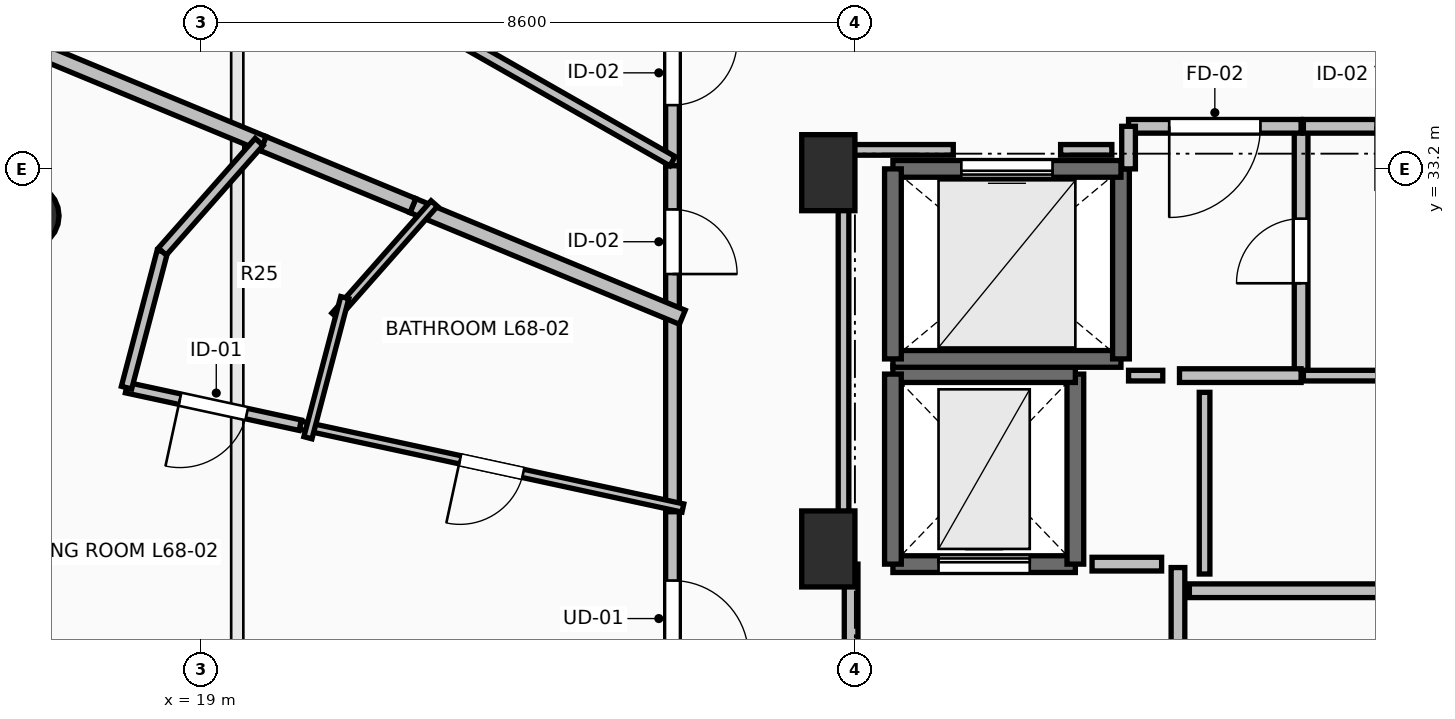
"""IFC4 building model, lengths in metres.
Left out: names, types, materials, properties, quantities, classifications, styles, units other than length and angle.
Written with IfcOpenShell. Run it as: python <this file> out.ifc"""

import sys

from ifc_helpers import new_model, si_unit, direction, frame, frame_2d, origin, origin_2d, place, context, subcontext, project, spatial, rectangle, circle, extrude, element, fill, save


model = new_model("IFC4")
c1 = context("Model", 3, precision=1e-05, world=origin(), true_north=direction((0.0, 1.0)))
c2 = subcontext(c1, "Body", "Model", "MODEL_VIEW")
j1 = project(units=[si_unit("LENGTHUNIT", "METRE"), si_unit("PLANEANGLEUNIT", "RADIAN")], contexts=[c1])
p1 = place(None, origin())
s1 = spatial("IfcSite", under=j1, at=p1, CompositionType="ELEMENT")
p2 = place(p1, origin())
s2 = spatial("IfcBuilding", under=s1, at=p2, CompositionType="ELEMENT")
p3 = place(p2, frame((0.0, 0.0, 252.0)))
s3 = spatial("IfcBuildingStorey", under=s2, at=p3, CompositionType="ELEMENT", Elevation=252.0)
p4 = place(p3, frame((16.705, 32.582, 0.0), z_axis=(0.0, 0.0, 1.0), x_axis=(-0.923879532511, 0.382683432365, 0.0)))
e1 = element("IfcColumn", 1, at=p4, inside=s3, PredefinedType="COLUMN", context=c2, shape_type="SweptSolid", body=[
    extrude(circle(Radius=0.425, at=origin_2d()), origin(), (0.0, 0.0, 1.0), 3.55),
])
for number, where, z_axis, x_axis in (
    (2, (27.25, 28.2, 0.0), (0.0, 0.0, 1.0), (1.0, 0.0, 0.0)),
    (3, (27.25, 33.15, 0.0), (0.0, 0.0, 1.0), (1.0, 0.0, 0.0)),
):
    element("IfcColumn", number, at=place(p3, frame(where, z_axis=z_axis, x_axis=x_axis)), inside=s3, PredefinedType="PILASTER", context=c2, shape_type="SweptSolid", body=[
        extrude(rectangle(XDim=0.7, YDim=1.0, at=origin_2d()), origin(), (0.0, 0.0, 1.0), 3.55),
    ])
p5 = place(p3, frame((28.1, 28.0, 0.0), z_axis=(0.0, 0.0, 1.0), x_axis=(1.0, 0.0, 0.0)))
e4 = element("IfcWall", 4, at=p5, inside=s3, PredefinedType="SHEAR", context=c2, shape_type="SweptSolid", body=[
    extrude(rectangle(XDim=2.4, YDim=0.22, at=frame_2d((1.2, 0.0))), origin(), (0.0, 0.0, 1.0), 3.29),
])
p6 = place(p5, frame((0.6, 0.0, 0.0)))
e5 = element("IfcOpeningElement", 5, at=p6, cuts=e4, PredefinedType="OPENING", context=c2, shape_type="SweptSolid", body=[
    extrude(rectangle(XDim=1.2, YDim=2.2, at=frame_2d((0.6, 1.1))), frame((0.0, 0.125, 0.0), z_axis=(0.0, -1.0, 0.0), x_axis=(1.0, 0.0, 0.0)), (0.0, 0.0, 1.0), 0.25),
])
p7 = place(p3, frame((30.5, 28.0, 0.0), z_axis=(0.0, 0.0, 1.0), x_axis=(0.0, 1.0, 0.0)))
e6 = element("IfcWall", 6, at=p7, inside=s3, PredefinedType="SHEAR", context=c2, shape_type="SweptSolid", body=[
    extrude(rectangle(XDim=2.5, YDim=0.22, at=frame_2d((1.25, 0.0))), origin(), (0.0, 0.0, 1.0), 3.29),
])
p8 = place(p3, frame((30.5, 30.5, 0.0), z_axis=(0.0, 0.0, 1.0), x_axis=(-1.0, 0.0, 0.0)))
e7 = element("IfcWall", 7, at=p8, inside=s3, PredefinedType="SHEAR", context=c2, shape_type="SweptSolid", body=[
    extrude(rectangle(XDim=2.4, YDim=0.22, at=frame_2d((1.2, 0.0))), origin(), (0.0, 0.0, 1.0), 3.29),
])
p9 = place(p3, frame((28.1, 30.5, 0.0), z_axis=(0.0, 0.0, 1.0), x_axis=(0.0, -1.0, 0.0)))
e8 = element("IfcWall", 8, at=p9, inside=s3, PredefinedType="SHEAR", context=c2, shape_type="SweptSolid", body=[
    extrude(rectangle(XDim=2.5, YDim=0.22, at=frame_2d((1.25, 0.0))), origin(), (0.0, 0.0, 1.0), 3.29),
])
p10 = place(p3, frame((28.1, 30.7, 0.0), z_axis=(0.0, 0.0, 1.0), x_axis=(1.0, 0.0, 0.0)))
e9 = element("IfcWall", 9, at=p10, inside=s3, PredefinedType="SOLIDWALL", context=c2, shape_type="SweptSolid", body=[
    extrude(rectangle(XDim=3.0, YDim=0.22, at=frame_2d((1.5, 0.0))), origin(), (0.0, 0.0, 1.0), 3.29),
])
p11 = place(p3, frame((31.1, 30.7, 0.0), z_axis=(0.0, 0.0, 1.0), x_axis=(0.0, 1.0, 0.0)))
e10 = element("IfcWall", 10, at=p11, inside=s3, PredefinedType="SOLIDWALL", context=c2, shape_type="SweptSolid", body=[
    extrude(rectangle(XDim=2.5, YDim=0.22, at=frame_2d((1.25, 0.0))), origin(), (0.0, 0.0, 1.0), 3.29),
])
p12 = place(p3, frame((31.1, 33.2, 0.0), z_axis=(0.0, 0.0, 1.0), x_axis=(-1.0, 0.0, 0.0)))
e11 = element("IfcWall", 11, at=p12, inside=s3, PredefinedType="SOLIDWALL", context=c2, shape_type="SweptSolid", body=[
    extrude(rectangle(XDim=3.0, YDim=0.22, at=frame_2d((1.5, 0.0))), origin(), (0.0, 0.0, 1.0), 3.29),
])
p13 = place(p12, frame((0.9, 0.0, 0.0)))
e12 = element("IfcOpeningElement", 12, at=p13, cuts=e11, PredefinedType="OPENING", context=c2, shape_type="SweptSolid", body=[
    extrude(rectangle(XDim=1.2, YDim=2.2, at=frame_2d((0.6, 1.1))), frame((0.0, 0.125, 0.0), z_axis=(0.0, -1.0, 0.0), x_axis=(1.0, 0.0, 0.0)), (0.0, 0.0, 1.0), 0.25),
])
p14 = place(p3, frame((28.1, 33.2, 0.0), z_axis=(0.0, 0.0, 1.0), x_axis=(0.0, -1.0, 0.0)))
e13 = element("IfcWall", 13, at=p14, inside=s3, PredefinedType="SOLIDWALL", context=c2, shape_type="SweptSolid", body=[
    extrude(rectangle(XDim=2.5, YDim=0.22, at=frame_2d((1.25, 0.0))), origin(), (0.0, 0.0, 1.0), 3.29),
])
p15 = place(p3, frame((31.85, 24.045, 0.0), z_axis=(0.0, 0.0, 1.0), x_axis=(0.0, 1.0, 0.0)))
e14 = element("IfcWall", 14, at=p15, inside=s3, PredefinedType="PARTITIONING", context=c2, shape_type="SweptSolid", body=[
    extrude(rectangle(XDim=3.91, YDim=0.18, at=frame_2d((1.955, 0.0))), origin(), (0.0, 0.0, 1.0), 3.29),
])
p16 = place(p15, frame((1.355, 0.0, 0.0)))
e15 = element("IfcOpeningElement", 15, at=p16, cuts=e14, PredefinedType="OPENING", context=c2, shape_type="SweptSolid", body=[
    extrude(rectangle(XDim=1.2, YDim=2.15, at=frame_2d((0.6, 1.075))), frame((0.0, 0.105, 0.0), z_axis=(0.0, -1.0, 0.0), x_axis=(1.0, 0.0, 0.0)), (0.0, 0.0, 1.0), 0.21),
])
p17 = place(p3, frame((27.55, 28.0, 0.0), z_axis=(0.0, 0.0, 1.0), x_axis=(0.0, -1.0, 0.0)))
e16 = element("IfcWall", 16, at=p17, inside=s3, PredefinedType="PARTITIONING", context=c2, shape_type="SweptSolid", body=[
    extrude(rectangle(XDim=4.05, YDim=0.18, at=frame_2d((2.025, 0.0))), origin(), (0.0, 0.0, 1.0), 3.29),
])
p18 = place(p17, frame((1.425, 0.0, 0.0)))
e17 = element("IfcOpeningElement", 17, at=p18, cuts=e16, PredefinedType="OPENING", context=c2, shape_type="SweptSolid", body=[
    extrude(rectangle(XDim=1.2, YDim=2.15, at=frame_2d((0.6, 1.075))), frame((0.0, 0.105, 0.0), z_axis=(0.0, -1.0, 0.0), x_axis=(1.0, 0.0, 0.0)), (0.0, 0.0, 1.0), 0.21),
])
p19 = place(p3, frame((33.47, 30.48, 0.0), z_axis=(0.0, 0.0, 1.0), x_axis=(0.0, 1.0, 0.0)))
e18 = element("IfcWall", 18, at=p19, inside=s3, PredefinedType="PARTITIONING", context=c2, shape_type="SweptSolid", body=[
    extrude(rectangle(XDim=3.28, YDim=0.18, at=frame_2d((1.64, 0.0))), origin(), (0.0, 0.0, 1.0), 3.29),
])
p20 = place(p19, frame((1.215, 0.0, 0.0)))
e19 = element("IfcOpeningElement", 19, at=p20, cuts=e18, PredefinedType="OPENING", context=c2, shape_type="SweptSolid", body=[
    extrude(rectangle(XDim=0.85, YDim=2.1, at=frame_2d((0.425, 1.05))), frame((0.0, 0.105, 0.0), z_axis=(0.0, -1.0, 0.0), x_axis=(1.0, 0.0, 0.0)), (0.0, 0.0, 1.0), 0.21),
])
p21 = place(p3, frame((31.87, 30.48, 0.0), z_axis=(0.0, 0.0, 1.0), x_axis=(1.0, 0.0, 0.0)))
e20 = element("IfcWall", 20, at=p21, inside=s3, PredefinedType="PARTITIONING", context=c2, shape_type="SweptSolid", body=[
    extrude(rectangle(XDim=1.6, YDim=0.18, at=frame_2d((0.8, 0.0))), origin(), (0.0, 0.0, 1.0), 3.29),
])
p22 = place(p3, frame((33.47, 33.76, 0.0), z_axis=(0.0, 0.0, 1.0), x_axis=(-1.0, 0.0, 0.0)))
e21 = element("IfcWall", 21, at=p22, inside=s3, PredefinedType="PARTITIONING", context=c2, shape_type="SweptSolid", body=[
    extrude(rectangle(XDim=2.27, YDim=0.18, at=frame_2d((1.135, 0.0))), origin(), (0.0, 0.0, 1.0), 3.29),
])
p23 = place(p22, frame((0.535, 0.0, 0.0)))
e22 = element("IfcOpeningElement", 22, at=p23, cuts=e21, PredefinedType="OPENING", context=c2, shape_type="SweptSolid", body=[
    extrude(rectangle(XDim=1.2, YDim=2.15, at=frame_2d((0.6, 1.075))), frame((0.0, 0.105, 0.0), z_axis=(0.0, -1.0, 0.0), x_axis=(1.0, 0.0, 0.0)), (0.0, 0.0, 1.0), 0.21),
])
p24 = place(p3, frame((31.2, 33.76, 0.0), z_axis=(0.0, 0.0, 1.0), x_axis=(0.0, -1.0, 0.0)))
e23 = element("IfcWall", 23, at=p24, inside=s3, PredefinedType="PARTITIONING", context=c2, shape_type="SweptSolid", body=[
    extrude(rectangle(XDim=0.56, YDim=0.18, at=frame_2d((0.28, 0.0))), origin(), (0.0, 0.0, 1.0), 3.29),
])
p25 = place(p3, frame((39.19, 27.65, 0.0), z_axis=(0.0, 0.0, 1.0), x_axis=(-1.0, 0.0, 0.0)))
e24 = element("IfcWall", 24, at=p25, inside=s3, PredefinedType="PARTITIONING", context=c2, shape_type="SweptSolid", body=[
    extrude(rectangle(XDim=7.19, YDim=0.18, at=frame_2d((3.595, 0.0))), origin(), (0.0, 0.0, 1.0), 3.29),
])
p26 = place(p25, frame((3.095, 0.0, 0.0)))
e25 = element("IfcOpeningElement", 25, at=p26, cuts=e24, PredefinedType="OPENING", context=c2, shape_type="SweptSolid", body=[
    extrude(rectangle(XDim=1.0, YDim=2.15, at=frame_2d((0.5, 1.075))), frame((0.0, 0.105, 0.0), z_axis=(0.0, -1.0, 0.0), x_axis=(1.0, 0.0, 0.0)), (0.0, 0.0, 1.0), 0.21),
])
p27 = place(p3, frame((33.5, 30.48, 0.0), z_axis=(0.0, 0.0, 1.0), x_axis=(1.0, 0.0, 0.0)))
e26 = element("IfcWall", 26, at=p27, inside=s3, PredefinedType="PARTITIONING", context=c2, shape_type="SweptSolid", body=[
    extrude(rectangle(XDim=2.75, YDim=0.14, at=frame_2d((1.375, 0.0))), origin(), (0.0, 0.0, 1.0), 2.482),
])
p28 = place(p3, frame((36.25, 33.76, 0.0), z_axis=(0.0, 0.0, 1.0), x_axis=(-1.0, 0.0, 0.0)))
e27 = element("IfcWall", 27, at=p28, inside=s3, PredefinedType="PARTITIONING", context=c2, shape_type="SweptSolid", body=[
    extrude(rectangle(XDim=2.75, YDim=0.18, at=frame_2d((1.375, 0.0))), origin(), (0.0, 0.0, 1.0), 3.29),
])
p29 = place(p28, frame((0.95, 0.0, 0.0)))
e28 = element("IfcOpeningElement", 28, at=p29, cuts=e27, PredefinedType="OPENING", context=c2, shape_type="SweptSolid", body=[
    extrude(rectangle(XDim=0.85, YDim=2.1, at=frame_2d((0.425, 1.05))), frame((0.0, 0.105, 0.0), z_axis=(0.0, -1.0, 0.0), x_axis=(1.0, 0.0, 0.0)), (0.0, 0.0, 1.0), 0.21),
])
p30 = place(p3, frame((25.2, 35.686, 0.0), z_axis=(0.0, 0.0, 1.0), x_axis=(0.0, -1.0, 0.0)))
e29 = element("IfcWall", 29, at=p30, inside=s3, PredefinedType="PARTITIONING", context=c2, shape_type="SweptSolid", body=[
    extrude(rectangle(XDim=2.445, YDim=0.18, at=frame_2d((1.223, 0.0))), origin(), (0.0, 0.0, 1.0), 2.482),
])
p31 = place(p30, frame((0.798, 0.0, 0.0)))
e30 = element("IfcOpeningElement", 30, at=p31, cuts=e29, PredefinedType="OPENING", context=c2, shape_type="SweptSolid", body=[
    extrude(rectangle(XDim=0.85, YDim=2.1, at=frame_2d((0.425, 1.05))), frame((0.0, 0.105, 0.0), z_axis=(0.0, -1.0, 0.0), x_axis=(1.0, 0.0, 0.0)), (0.0, 0.0, 1.0), 0.21),
])
p32 = place(p3, frame((25.2, 33.241, 0.0), z_axis=(0.0, 0.0, 1.0), x_axis=(0.0, -1.0, 0.0)))
e31 = element("IfcWall", 31, at=p32, inside=s3, PredefinedType="PARTITIONING", context=c2, shape_type="SweptSolid", body=[
    extrude(rectangle(XDim=1.999, YDim=0.18, at=frame_2d((1.0, 0.0))), origin(), (0.0, 0.0, 1.0), 3.022),
])
p33 = place(p32, frame((0.574, 0.0, 0.0)))
e32 = element("IfcOpeningElement", 32, at=p33, cuts=e31, PredefinedType="OPENING", context=c2, shape_type="SweptSolid", body=[
    extrude(rectangle(XDim=0.85, YDim=2.1, at=frame_2d((0.425, 1.05))), frame((0.0, 0.105, 0.0), z_axis=(0.0, -1.0, 0.0), x_axis=(1.0, 0.0, 0.0)), (0.0, 0.0, 1.0), 0.21),
])
p34 = place(p3, frame((25.2, 28.829, 0.0), z_axis=(0.0, 0.0, 1.0), x_axis=(0.0, -1.0, 0.0)))
e33 = element("IfcWall", 33, at=p34, inside=s3, PredefinedType="PARTITIONING", context=c2, shape_type="SweptSolid", body=[
    extrude(rectangle(XDim=3.09, YDim=0.18, at=frame_2d((1.545, 0.0))), origin(), (0.0, 0.0, 1.0), 2.482),
])
p35 = place(p34, frame((1.045, 0.0, 0.0)))
e34 = element("IfcOpeningElement", 34, at=p35, cuts=e33, PredefinedType="OPENING", context=c2, shape_type="SweptSolid", body=[
    extrude(rectangle(XDim=1.0, YDim=2.15, at=frame_2d((0.5, 1.075))), frame((0.0, 0.105, 0.0), z_axis=(0.0, -1.0, 0.0), x_axis=(1.0, 0.0, 0.0)), (0.0, 0.0, 1.0), 0.21),
])
p36 = place(p3, frame((25.2, 31.382, 0.0), z_axis=(0.0, 0.0, 1.0), x_axis=(0.0, -1.0, 0.0)))
e35 = element("IfcWall", 35, at=p36, inside=s3, PredefinedType="PARTITIONING", context=c2, shape_type="SweptSolid", body=[
    extrude(rectangle(XDim=2.693, YDim=0.18, at=frame_2d((1.347, 0.0))), origin(), (0.0, 0.0, 1.0), 2.482),
])
p37 = place(p3, frame((17.17, 37.881, 0.0), z_axis=(0.0, 0.0, 1.0), x_axis=(0.868639415668, -0.495444815844, 0.0)))
e36 = element("IfcWall", 36, at=p37, inside=s3, PredefinedType="PARTITIONING", context=c2, shape_type="SweptSolid", body=[
    extrude(rectangle(XDim=9.244, YDim=0.14, at=frame_2d((4.622, 0.0))), origin(), (0.0, 0.0, 1.0), 2.874),
])
p38 = place(p3, frame((15.133, 35.472, 0.0), z_axis=(0.0, 0.0, 1.0), x_axis=(0.923891232285, -0.382655185392, 0.0)))
e37 = element("IfcWall", 37, at=p38, inside=s3, PredefinedType="PARTITIONING", context=c2, shape_type="SweptSolid", body=[
    extrude(rectangle(XDim=5.07, YDim=0.2, at=frame_2d((2.535, 0.0))), origin(), (0.0, 0.0, 1.0), 2.874),
])
p39 = place(p3, frame((21.785, 32.717, 0.0), z_axis=(0.0, 0.0, 1.0), x_axis=(0.923878783617, -0.382685240352, 0.0)))
e38 = element("IfcWall", 38, at=p39, inside=s3, PredefinedType="PARTITIONING", context=c2, shape_type="SweptSolid", body=[
    extrude(rectangle(XDim=3.837, YDim=0.2, at=frame_2d((1.918, 0.0))), origin(), (0.0, 0.0, 1.0), 2.972),
])
p40 = place(p3, frame((19.817, 33.532, 0.0), z_axis=(0.0, 0.0, 1.0), x_axis=(0.92391905869, -0.382587993786, 0.0)))
e39 = element("IfcWall", 39, at=p40, inside=s3, PredefinedType="PARTITIONING", context=c2, shape_type="SweptSolid", body=[
    extrude(rectangle(XDim=2.13, YDim=0.2, at=frame_2d((1.065, 0.0))), origin(), (0.0, 0.0, 1.0), 2.972),
])
p41 = place(p3, frame((25.337, 28.738, 0.0), z_axis=(0.0, 0.0, 1.0), x_axis=(-0.977382932841, 0.211477191656, 0.0)))
e40 = element("IfcWall", 40, at=p41, inside=s3, PredefinedType="PARTITIONING", context=c2, shape_type="SweptSolid", body=[
    extrude(rectangle(XDim=5.151, YDim=0.11, at=frame_2d((2.576, 0.0))), origin(), (0.0, 0.0, 1.0), 2.482),
])
p42 = place(p41, frame((2.15, 0.0, 0.0)))
e41 = element("IfcOpeningElement", 41, at=p42, cuts=e40, PredefinedType="OPENING", context=c2, shape_type="SweptSolid", body=[
    extrude(rectangle(XDim=0.85, YDim=2.1, at=frame_2d((0.425, 1.05))), frame((0.0, 0.07, 0.0), z_axis=(0.0, -1.0, 0.0), x_axis=(1.0, 0.0, 0.0)), (0.0, 0.0, 1.0), 0.14),
])
p43 = place(p3, frame((20.302, 29.828, 0.0), z_axis=(0.0, 0.0, 1.0), x_axis=(-0.977387924942, 0.211454118377, 0.0)))
e42 = element("IfcWall", 42, at=p43, inside=s3, PredefinedType="PARTITIONING", context=c2, shape_type="SweptSolid", body=[
    extrude(rectangle(XDim=2.338, YDim=0.14, at=frame_2d((1.169, 0.0))), origin(), (0.0, 0.0, 1.0), 2.972),
])
p44 = place(p43, frame((0.719, 0.0, 0.0)))
e43 = element("IfcOpeningElement", 43, at=p44, cuts=e42, PredefinedType="OPENING", context=c2, shape_type="SweptSolid", body=[
    extrude(rectangle(XDim=0.9, YDim=2.1, at=frame_2d((0.45, 1.05))), frame((0.0, 0.085, 0.0), z_axis=(0.0, -1.0, 0.0), x_axis=(1.0, 0.0, 0.0)), (0.0, 0.0, 1.0), 0.17),
])
p45 = place(p3, frame((18.017, 30.322, 0.0), z_axis=(0.0, 0.0, 1.0), x_axis=(0.254434866485, 0.967089912426, 0.0)))
e44 = element("IfcWall", 44, at=p45, inside=s3, PredefinedType="PARTITIONING", context=c2, shape_type="SweptSolid", body=[
    extrude(rectangle(XDim=1.851, YDim=0.14, at=frame_2d((0.926, 0.0))), origin(), (0.0, 0.0, 1.0), 2.482),
])
p46 = place(p3, frame((18.488, 32.112, 0.0), z_axis=(0.0, 0.0, 1.0), x_axis=(0.661856531983, 0.749630529709, 0.0)))
e45 = element("IfcWall", 45, at=p46, inside=s3, PredefinedType="PARTITIONING", context=c2, shape_type="SweptSolid", body=[
    extrude(rectangle(XDim=1.925, YDim=0.14, at=frame_2d((0.962, 0.0))), origin(), (0.0, 0.0, 1.0), 2.482),
])
p47 = place(p3, frame((22.066, 32.744, 0.0), z_axis=(0.0, 0.0, 1.0), x_axis=(-0.662047420969, -0.749461948593, 0.0)))
e46 = element("IfcWall", 46, at=p47, inside=s3, PredefinedType="PARTITIONING", context=c2, shape_type="SweptSolid", body=[
    extrude(rectangle(XDim=1.972, YDim=0.11, at=frame_2d((0.986, 0.0))), origin(), (0.0, 0.0, 1.0), 2.972),
])
p48 = place(p3, frame((20.889, 31.506, 0.0), z_axis=(0.0, 0.0, 1.0), x_axis=(-0.254568935897, -0.967054629727, 0.0)))
e47 = element("IfcWall", 47, at=p48, inside=s3, PredefinedType="PARTITIONING", context=c2, shape_type="SweptSolid", body=[
    extrude(rectangle(XDim=1.906, YDim=0.11, at=frame_2d((0.953, 0.0))), origin(), (0.0, 0.0, 1.0), 2.482),
])
p49 = place(p3, frame((31.635, 28.0, 0.0), z_axis=(0.0, 0.0, 1.0), x_axis=(-1.0, 0.0, 0.0)))
e48 = element("IfcWall", 48, at=p49, inside=s3, PredefinedType="PARTITIONING", context=c2, shape_type="SweptSolid", body=[
    extrude(rectangle(XDim=0.915, YDim=0.18, at=frame_2d((0.458, 0.0))), origin(), (0.0, 0.0, 1.0), 3.29),
])
p50 = place(p3, frame((31.2, 30.48, 0.0), z_axis=(0.0, 0.0, 1.0), x_axis=(1.0, 0.0, 0.0)))
e49 = element("IfcWall", 49, at=p50, inside=s3, PredefinedType="PARTITIONING", context=c2, shape_type="SweptSolid", body=[
    extrude(rectangle(XDim=0.45, YDim=0.14, at=frame_2d((0.225, 0.0))), origin(), (0.0, 0.0, 1.0), 3.29),
])
p51 = place(p3, frame((32.2, 30.26, 0.0), z_axis=(0.0, 0.0, 1.0), x_axis=(0.0, -1.0, 0.0)))
e50 = element("IfcWall", 50, at=p51, inside=s3, PredefinedType="PARTITIONING", context=c2, shape_type="SweptSolid", body=[
    extrude(rectangle(XDim=2.39, YDim=0.14, at=frame_2d((1.195, 0.0))), origin(), (0.0, 0.0, 1.0), 3.29),
])
p52 = place(p3, frame((30.98, 33.45, 0.0), z_axis=(0.0, 0.0, 1.0), x_axis=(-1.0, 0.0, 0.0)))
e51 = element("IfcWall", 51, at=p52, inside=s3, PredefinedType="PARTITIONING", context=c2, shape_type="SweptSolid", body=[
    extrude(rectangle(XDim=0.674, YDim=0.14, at=frame_2d((0.337, 0.0))), origin(), (0.0, 0.0, 1.0), 3.29),
])
p53 = place(p3, frame((28.894, 33.45, 0.0), z_axis=(0.0, 0.0, 1.0), x_axis=(-1.0, 0.0, 0.0)))
e52 = element("IfcWall", 52, at=p53, inside=s3, PredefinedType="PARTITIONING", context=c2, shape_type="SweptSolid", body=[
    extrude(rectangle(XDim=1.444, YDim=0.14, at=frame_2d((0.722, 0.0))), origin(), (0.0, 0.0, 1.0), 2.482),
])
p54 = place(p3, frame((27.45, 33.45, 0.0), z_axis=(0.0, 0.0, 1.0), x_axis=(0.0, -1.0, 0.0)))
e53 = element("IfcWall", 53, at=p54, inside=s3, PredefinedType="PARTITIONING", context=c2, shape_type="SweptSolid", body=[
    extrude(rectangle(XDim=5.254, YDim=0.14, at=frame_2d((2.627, 0.0))), origin(), (0.0, 0.0, 1.0), 2.482),
])
p55 = place(p6, origin())
e54 = element("IfcDoor", 54, at=p55, inside=s3, OperationType="SLIDING_TO_LEFT", PredefinedType="DOOR", context=c2, shape_type="SweptSolid", body=[
    extrude(rectangle(XDim=1.2, YDim=2.2, at=frame_2d((0.6, 1.1))), frame((0.0, 0.025, 0.0), z_axis=(0.0, -1.0, 0.0), x_axis=(1.0, 0.0, 0.0)), (0.0, 0.0, 1.0), 0.05),
])
fill(e5, e54)
p56 = place(p13, origin())
e55 = element("IfcDoor", 55, at=p56, inside=s3, OperationType="SLIDING_TO_LEFT", PredefinedType="DOOR", context=c2, shape_type="SweptSolid", body=[
    extrude(rectangle(XDim=1.2, YDim=2.2, at=frame_2d((0.6, 1.1))), frame((0.0, 0.025, 0.0), z_axis=(0.0, -1.0, 0.0), x_axis=(1.0, 0.0, 0.0)), (0.0, 0.0, 1.0), 0.05),
])
fill(e12, e55)
p57 = place(p20, origin())
e56 = element("IfcDoor", 56, at=p57, inside=s3, OperationType="SINGLE_SWING_LEFT", PredefinedType="DOOR", context=c2, shape_type="SweptSolid", body=[
    extrude(rectangle(XDim=0.85, YDim=2.1, at=frame_2d((0.425, 1.05))), frame((0.0, 0.025, 0.0), z_axis=(0.0, -1.0, 0.0), x_axis=(1.0, 0.0, 0.0)), (0.0, 0.0, 1.0), 0.05),
])
fill(e19, e56)
p58 = place(p23, origin())
e57 = element("IfcDoor", 57, at=p58, inside=s3, OperationType="SINGLE_SWING_RIGHT", PredefinedType="DOOR", context=c2, shape_type="SweptSolid", body=[
    extrude(rectangle(XDim=1.2, YDim=2.15, at=frame_2d((0.6, 1.075))), frame((0.0, 0.025, 0.0), z_axis=(0.0, -1.0, 0.0), x_axis=(1.0, 0.0, 0.0)), (0.0, 0.0, 1.0), 0.05),
])
fill(e22, e57)
p59 = place(p35, origin())
e58 = element("IfcDoor", 58, at=p59, inside=s3, OperationType="SINGLE_SWING_RIGHT", PredefinedType="DOOR", context=c2, shape_type="SweptSolid", body=[
    extrude(rectangle(XDim=1.0, YDim=2.15, at=frame_2d((0.5, 1.075))), frame((0.0, 0.025, 0.0), z_axis=(0.0, -1.0, 0.0), x_axis=(1.0, 0.0, 0.0)), (0.0, 0.0, 1.0), 0.05),
])
fill(e34, e58)
p60 = place(p42, origin())
e59 = element("IfcDoor", 59, at=p60, inside=s3, OperationType="SINGLE_SWING_RIGHT", PredefinedType="DOOR", context=c2, shape_type="SweptSolid", body=[
    extrude(rectangle(XDim=0.85, YDim=2.1, at=frame_2d((0.425, 1.05))), frame((0.0, 0.025, 0.0), z_axis=(0.0, -1.0, 0.0), x_axis=(1.0, 0.0, 0.0)), (0.0, 0.0, 1.0), 0.05),
])
fill(e41, e59)
p61 = place(p44, origin())
e60 = element("IfcDoor", 60, at=p61, inside=s3, OperationType="SINGLE_SWING_RIGHT", PredefinedType="DOOR", context=c2, shape_type="SweptSolid", body=[
    extrude(rectangle(XDim=0.9, YDim=2.1, at=frame_2d((0.45, 1.05))), frame((0.0, 0.025, 0.0), z_axis=(0.0, -1.0, 0.0), x_axis=(1.0, 0.0, 0.0)), (0.0, 0.0, 1.0), 0.05),
])
fill(e43, e60)
p62 = place(p31, origin())
e61 = element("IfcDoor", 61, at=p62, inside=s3, OperationType="SINGLE_SWING_LEFT", PredefinedType="DOOR", context=c2, shape_type="SweptSolid", body=[
    extrude(rectangle(XDim=0.85, YDim=2.1, at=frame_2d((0.425, 1.05))), frame((0.0, 0.025, 0.0), z_axis=(0.0, -1.0, 0.0), x_axis=(1.0, 0.0, 0.0)), (0.0, 0.0, 1.0), 0.05),
])
fill(e30, e61)
p63 = place(p33, origin())
e62 = element("IfcDoor", 62, at=p63, inside=s3, OperationType="SINGLE_SWING_RIGHT", PredefinedType="DOOR", context=c2, shape_type="SweptSolid", body=[
    extrude(rectangle(XDim=0.85, YDim=2.1, at=frame_2d((0.425, 1.05))), frame((0.0, 0.025, 0.0), z_axis=(0.0, -1.0, 0.0), x_axis=(1.0, 0.0, 0.0)), (0.0, 0.0, 1.0), 0.05),
])
fill(e32, e62)
save(model, sys.argv[1])
